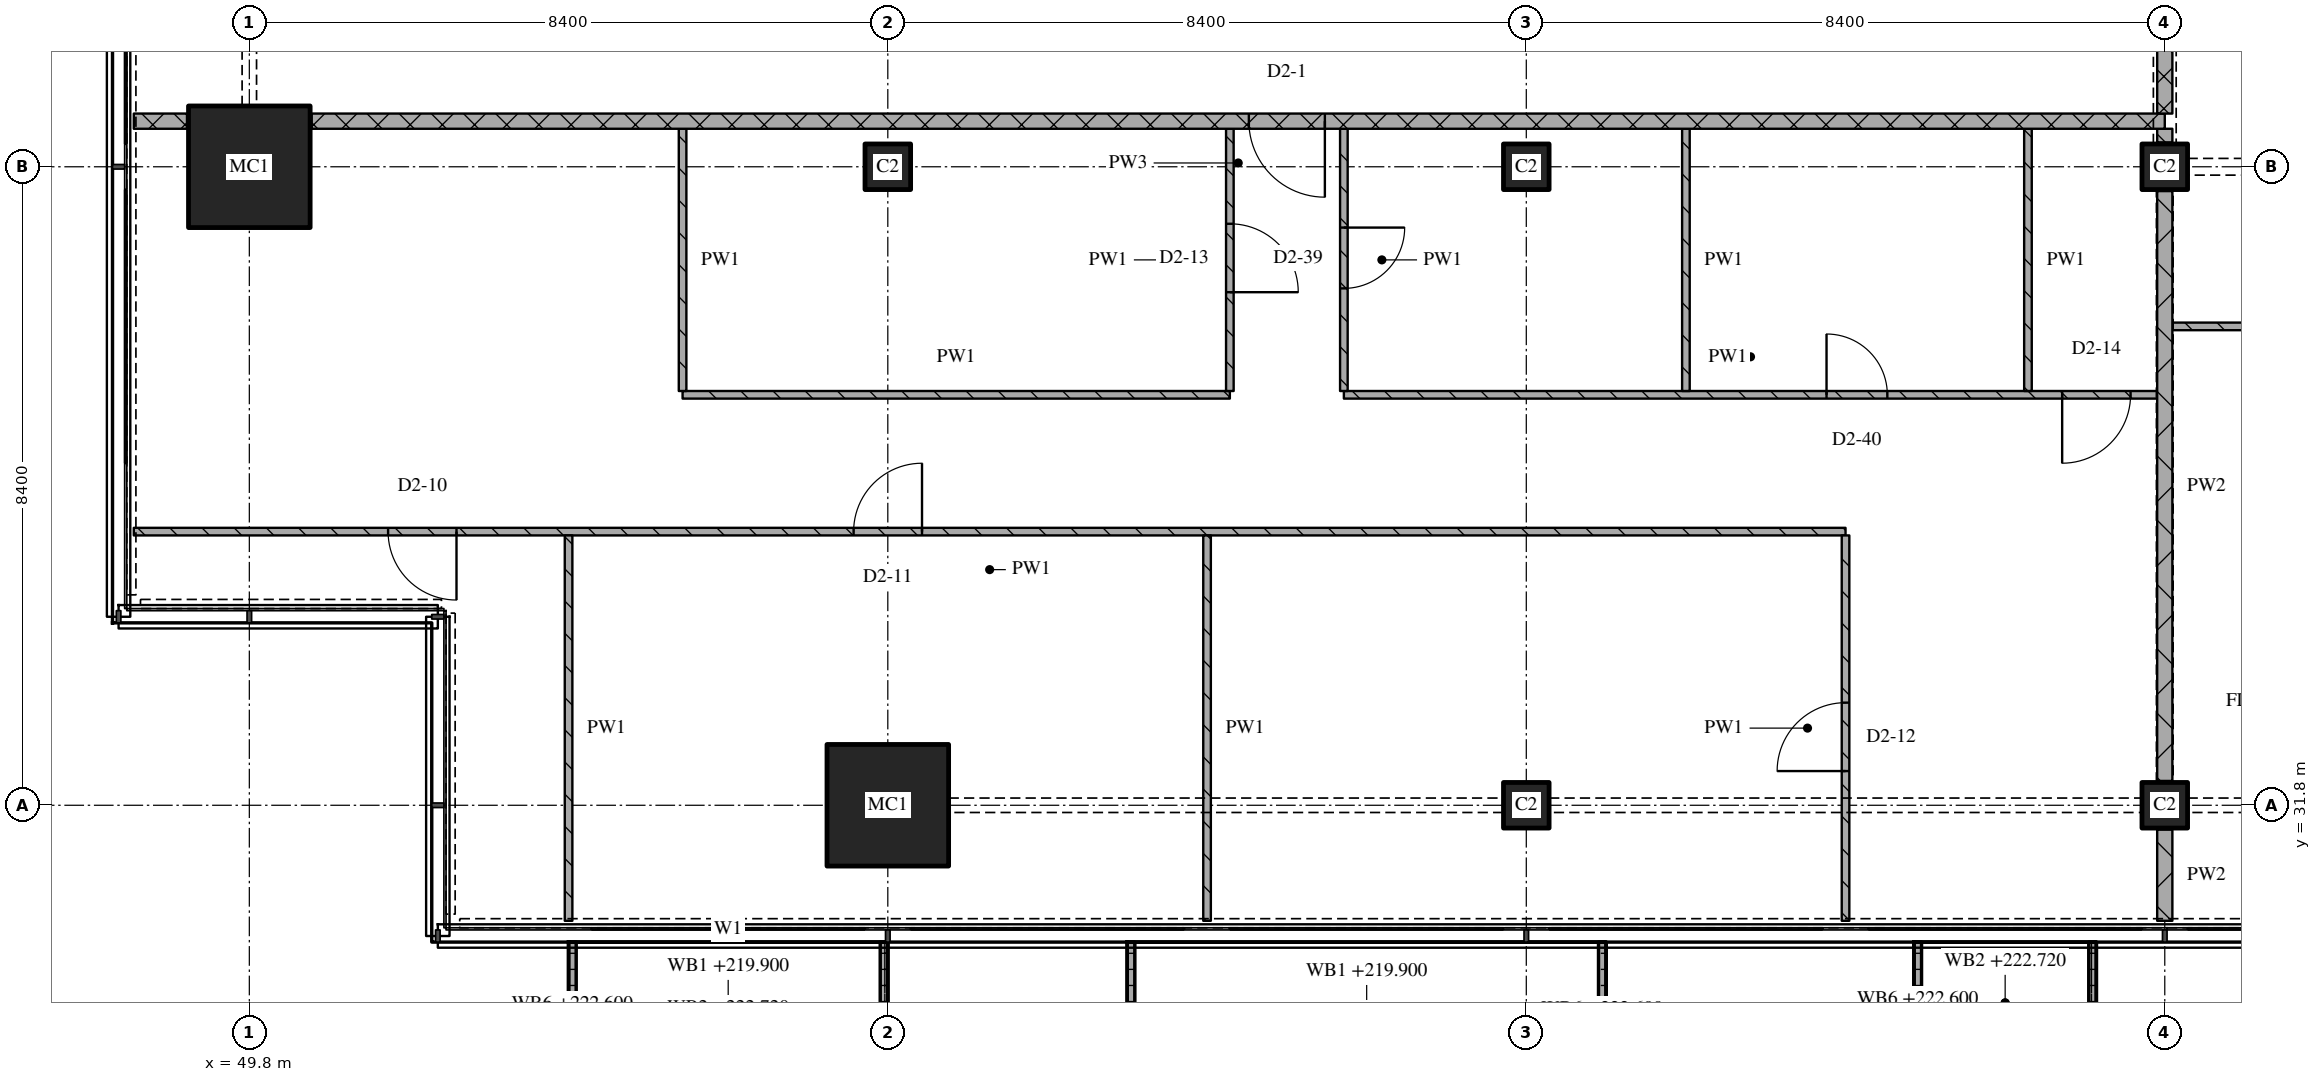
"""IFC4 building model, lengths in metres.
Left out: names, types, materials, properties, quantities, classifications, styles, units other than length and angle.
Written with IfcOpenShell. Run it as: python <this file> out.ifc"""

import sys

from ifc_helpers import new_model, si_unit, direction, frame, frame_2d, origin, origin_2d, place, context, subcontext, project, spatial, polyline, rectangle, outline, extrude, element, fill, save


model = new_model("IFC4")
c1 = context("Model", 3, precision=1e-05, world=origin(), true_north=direction((0.0, 1.0)))
c2 = subcontext(c1, "Body", "Model", "MODEL_VIEW")
j1 = project(units=[si_unit("LENGTHUNIT", "METRE"), si_unit("PLANEANGLEUNIT", "RADIAN")], contexts=[c1])
p1 = place(None, origin())
s1 = spatial("IfcSite", under=j1, at=p1, CompositionType="ELEMENT")
p2 = place(p1, origin())
s2 = spatial("IfcBuilding", under=s1, at=p2, CompositionType="ELEMENT")
p3 = place(p2, frame((0.0, 0.0, 219.9)))
s3 = spatial("IfcBuildingStorey", under=s2, at=p3, CompositionType="ELEMENT", Elevation=219.9)
for number, where, z_axis, x_axis in (
    (1, (49.8, 40.2, 0.0), (0.0, 0.0, 1.0), (1.0, 0.0, 0.0)),
    (2, (58.2, 31.8, 0.0), (0.0, 0.0, 1.0), (1.0, 0.0, 0.0)),
):
    element("IfcColumn", number, at=place(p3, frame(where, z_axis=z_axis, x_axis=x_axis)), inside=s3, PredefinedType="COLUMN", context=c2, shape_type="SweptSolid", body=[
        extrude(rectangle(XDim=1.6, YDim=1.6, at=origin_2d()), origin(), (0.0, 0.0, 1.0), 3.6),
    ])
for number, where, z_axis, x_axis in (
    (3, (58.2, 40.2, 0.0), (0.0, 0.0, 1.0), (1.0, 0.0, 0.0)),
    (4, (66.6, 31.8, 0.0), (0.0, 0.0, 1.0), (1.0, 0.0, 0.0)),
    (5, (66.6, 40.2, 0.0), (0.0, 0.0, 1.0), (1.0, 0.0, 0.0)),
    (6, (75.0, 31.8, 0.0), (0.0, 0.0, 1.0), (1.0, 0.0, 0.0)),
    (7, (75.0, 40.2, 0.0), (0.0, 0.0, 1.0), (1.0, 0.0, 0.0)),
):
    element("IfcColumn", number, at=place(p3, frame(where, z_axis=z_axis, x_axis=x_axis)), inside=s3, PredefinedType="COLUMN", context=c2, shape_type="SweptSolid", body=[
        extrude(rectangle(XDim=0.6, YDim=0.6, at=origin_2d()), origin(), (0.0, 0.0, 1.0), 3.6),
    ])
p4 = place(p3, origin())
e8 = element("IfcWall", 8, at=p4, inside=s3, PredefinedType="SOLIDWALL", context=c2, shape_type="SweptSolid", body=[
    extrude(outline(polyline([(54.0, 30.0), (54.1, 30.0), (54.1, 28.367), (58.1, 28.367), (58.1, 30.0), (58.2, 30.0), (58.2, 28.267), (54.0, 28.267), (54.0, 30.0)])), origin(), (0.0, 0.0, 1.0), 1.0),
])
p5 = place(p3, origin())
e9 = element("IfcWall", 9, at=p5, inside=s3, PredefinedType="SOLIDWALL", context=c2, shape_type="SweptSolid", body=[
    extrude(outline(polyline([(61.35, 30.0), (61.45, 30.0), (61.45, 28.233), (67.55, 28.233), (67.55, 30.0), (67.65, 30.0), (67.65, 28.133), (61.35, 28.133), (61.35, 30.0)])), origin(), (0.0, 0.0, 1.0), 1.0),
])
p6 = place(p3, origin())
e10 = element("IfcWall", 10, at=p6, inside=s3, PredefinedType="SOLIDWALL", context=c2, shape_type="SweptSolid", body=[
    extrude(outline(polyline([(71.7, 30.0), (71.8, 30.0), (71.8, 28.5), (74.0, 28.5), (74.0, 30.0), (74.1, 30.0), (74.1, 28.4), (71.7, 28.4), (71.7, 30.0)])), origin(), (0.0, 0.0, 1.0), 1.0),
])
p7 = place(p3, frame((70.8, 35.4, 0.0), z_axis=(0.0, 0.0, 1.0), x_axis=(-1.0, 0.0, 0.0)))
e11 = element("IfcWall", 11, at=p7, inside=s3, PredefinedType="PARTITIONING", context=c2, shape_type="SweptSolid", body=[
    extrude(rectangle(XDim=22.52, YDim=0.1, at=frame_2d((11.26, 0.0))), origin(), (0.0, 0.0, 1.0), 3.32),
])
p8 = place(p7, frame((12.15, 0.0, 0.0)))
e12 = element("IfcOpeningElement", 12, at=p8, cuts=e11, PredefinedType="OPENING", context=c2, shape_type="SweptSolid", body=[
    extrude(rectangle(XDim=0.9, YDim=2.1, at=frame_2d((0.45, 1.05))), frame((0.0, 0.06, 0.0), z_axis=(0.0, -1.0, 0.0), x_axis=(1.0, 0.0, 0.0)), (0.0, 0.0, 1.0), 0.12),
])
p9 = place(p7, frame((18.274, 0.0, 0.0)))
e13 = element("IfcOpeningElement", 13, at=p9, cuts=e11, PredefinedType="OPENING", context=c2, shape_type="SweptSolid", body=[
    extrude(rectangle(XDim=0.9, YDim=2.1, at=frame_2d((0.45, 1.05))), frame((0.0, 0.06, 0.0), z_axis=(0.0, -1.0, 0.0), x_axis=(1.0, 0.0, 0.0)), (0.0, 0.0, 1.0), 0.12),
])
p10 = place(p3, frame((55.5, 37.2, 0.0), z_axis=(0.0, 0.0, 1.0), x_axis=(1.0, 0.0, 0.0)))
e14 = element("IfcWall", 14, at=p10, inside=s3, PredefinedType="PARTITIONING", context=c2, shape_type="SweptSolid", body=[
    extrude(rectangle(XDim=7.2, YDim=0.1, at=frame_2d((3.6, 0.0))), origin(), (0.0, 0.0, 1.0), 3.32),
])
p11 = place(p3, frame((64.2, 37.2, 0.0), z_axis=(0.0, 0.0, 1.0), x_axis=(1.0, 0.0, 0.0)))
e15 = element("IfcWall", 15, at=p11, inside=s3, PredefinedType="PARTITIONING", context=c2, shape_type="SweptSolid", body=[
    extrude(rectangle(XDim=10.7, YDim=0.1, at=frame_2d((5.35, 0.0))), origin(), (0.0, 0.0, 1.0), 3.32),
])
p12 = place(p11, frame((6.35, 0.0, 0.0)))
e16 = element("IfcOpeningElement", 16, at=p12, cuts=e15, PredefinedType="OPENING", context=c2, shape_type="SweptSolid", body=[
    extrude(rectangle(XDim=0.8, YDim=2.1, at=frame_2d((0.4, 1.05))), frame((0.0, 0.06, 0.0), z_axis=(0.0, -1.0, 0.0), x_axis=(1.0, 0.0, 0.0)), (0.0, 0.0, 1.0), 0.12),
])
p13 = place(p11, frame((9.45, 0.0, 0.0)))
e17 = element("IfcOpeningElement", 17, at=p13, cuts=e15, PredefinedType="OPENING", context=c2, shape_type="SweptSolid", body=[
    extrude(rectangle(XDim=0.9, YDim=2.1, at=frame_2d((0.45, 1.05))), frame((0.0, 0.06, 0.0), z_axis=(0.0, -1.0, 0.0), x_axis=(1.0, 0.0, 0.0)), (0.0, 0.0, 1.0), 0.12),
])
p14 = place(p3, frame((75.1, 38.1, 0.0), z_axis=(0.0, 0.0, 1.0), x_axis=(1.0, 0.0, 0.0)))
e18 = element("IfcWall", 18, at=p14, inside=s3, PredefinedType="PARTITIONING", context=c2, shape_type="SweptSolid", body=[
    extrude(rectangle(XDim=11.3, YDim=0.1, at=frame_2d((5.65, 0.0))), origin(), (0.0, 0.0, 1.0), 3.32),
])
p15 = place(p14, frame((1.75, 0.0, 0.0)))
e19 = element("IfcOpeningElement", 19, at=p15, cuts=e18, PredefinedType="OPENING", context=c2, shape_type="SweptSolid", body=[
    extrude(rectangle(XDim=0.8, YDim=2.1, at=frame_2d((0.4, 1.05))), frame((0.0, 0.06, 0.0), z_axis=(0.0, -1.0, 0.0), x_axis=(1.0, 0.0, 0.0)), (0.0, 0.0, 1.0), 0.12),
])
p16 = place(p14, frame((6.25, 0.0, 0.0)))
e20 = element("IfcOpeningElement", 20, at=p16, cuts=e18, PredefinedType="OPENING", context=c2, shape_type="SweptSolid", body=[
    extrude(rectangle(XDim=0.8, YDim=2.1, at=frame_2d((0.4, 1.05))), frame((0.0, 0.06, 0.0), z_axis=(0.0, -1.0, 0.0), x_axis=(1.0, 0.0, 0.0)), (0.0, 0.0, 1.0), 0.12),
])
p17 = place(p14, frame((9.65, 0.0, 0.0)))
e21 = element("IfcOpeningElement", 21, at=p17, cuts=e18, PredefinedType="OPENING", context=c2, shape_type="SweptSolid", body=[
    extrude(rectangle(XDim=0.9, YDim=2.1, at=frame_2d((0.45, 1.05))), frame((0.0, 0.06, 0.0), z_axis=(0.0, -1.0, 0.0), x_axis=(1.0, 0.0, 0.0)), (0.0, 0.0, 1.0), 0.12),
])
p18 = place(p3, frame((48.28, 40.8, 0.0), z_axis=(0.0, 0.0, 1.0), x_axis=(1.0, 0.0, 0.0)))
e22 = element("IfcWall", 22, at=p18, inside=s3, PredefinedType="PARTITIONING", context=c2, shape_type="SweptSolid", body=[
    extrude(rectangle(XDim=0.7, YDim=0.2, at=frame_2d((0.35, 0.0))), origin(), (0.0, 0.0, 1.0), 3.32),
])
p19 = place(p3, frame((75.0, 40.8, 0.0), z_axis=(0.0, 0.0, 1.0), x_axis=(-1.0, 0.0, 0.0)))
e23 = element("IfcWall", 23, at=p19, inside=s3, PredefinedType="PARTITIONING", context=c2, shape_type="SweptSolid", body=[
    extrude(rectangle(XDim=24.38, YDim=0.2, at=frame_2d((12.19, 0.0))), origin(), (0.0, 0.0, 1.0), 3.32),
])
p20 = place(p19, frame((11.05, 0.0, 0.0)))
e24 = element("IfcOpeningElement", 24, at=p20, cuts=e23, PredefinedType="OPENING", context=c2, shape_type="SweptSolid", body=[
    extrude(rectangle(XDim=1.0, YDim=2.1, at=frame_2d((0.5, 1.05))), frame((0.0, 0.11, 0.0), z_axis=(0.0, -1.0, 0.0), x_axis=(1.0, 0.0, 0.0)), (0.0, 0.0, 1.0), 0.22),
])
p21 = place(p3, frame((54.0, 35.35, 0.0), z_axis=(0.0, 0.0, 1.0), x_axis=(0.0, -1.0, 0.0)))
e25 = element("IfcWall", 25, at=p21, inside=s3, PredefinedType="PARTITIONING", context=c2, shape_type="SweptSolid", body=[
    extrude(rectangle(XDim=5.07, YDim=0.1, at=frame_2d((2.535, 0.0))), origin(), (0.0, 0.0, 1.0), 3.32),
])
p22 = place(p3, frame((55.5, 40.7, 0.0), z_axis=(0.0, 0.0, 1.0), x_axis=(0.0, -1.0, 0.0)))
e26 = element("IfcWall", 26, at=p22, inside=s3, PredefinedType="PARTITIONING", context=c2, shape_type="SweptSolid", body=[
    extrude(rectangle(XDim=3.45, YDim=0.1, at=frame_2d((1.725, 0.0))), origin(), (0.0, 0.0, 1.0), 3.32),
])
p23 = place(p3, frame((62.4, 35.35, 0.0), z_axis=(0.0, 0.0, 1.0), x_axis=(0.0, -1.0, 0.0)))
e27 = element("IfcWall", 27, at=p23, inside=s3, PredefinedType="PARTITIONING", context=c2, shape_type="SweptSolid", body=[
    extrude(rectangle(XDim=5.07, YDim=0.1, at=frame_2d((2.535, 0.0))), origin(), (0.0, 0.0, 1.0), 3.32),
])
p24 = place(p3, frame((62.7, 37.25, 0.0), z_axis=(0.0, 0.0, 1.0), x_axis=(0.0, 1.0, 0.0)))
e28 = element("IfcWall", 28, at=p24, inside=s3, PredefinedType="PARTITIONING", context=c2, shape_type="SweptSolid", body=[
    extrude(rectangle(XDim=3.45, YDim=0.1, at=frame_2d((1.725, 0.0))), origin(), (0.0, 0.0, 1.0), 3.32),
])
p25 = place(p24, frame((1.3, 0.0, 0.0)))
e29 = element("IfcOpeningElement", 29, at=p25, cuts=e28, PredefinedType="OPENING", context=c2, shape_type="SweptSolid", body=[
    extrude(rectangle(XDim=0.9, YDim=2.1, at=frame_2d((0.45, 1.05))), frame((0.0, 0.06, 0.0), z_axis=(0.0, -1.0, 0.0), x_axis=(1.0, 0.0, 0.0)), (0.0, 0.0, 1.0), 0.12),
])
p26 = place(p3, frame((64.2, 40.7, 0.0), z_axis=(0.0, 0.0, 1.0), x_axis=(0.0, -1.0, 0.0)))
e30 = element("IfcWall", 30, at=p26, inside=s3, PredefinedType="PARTITIONING", context=c2, shape_type="SweptSolid", body=[
    extrude(rectangle(XDim=3.45, YDim=0.1, at=frame_2d((1.725, 0.0))), origin(), (0.0, 0.0, 1.0), 3.32),
])
p27 = place(p26, frame((1.3, 0.0, 0.0)))
e31 = element("IfcOpeningElement", 31, at=p27, cuts=e30, PredefinedType="OPENING", context=c2, shape_type="SweptSolid", body=[
    extrude(rectangle(XDim=0.8, YDim=2.1, at=frame_2d((0.4, 1.05))), frame((0.0, 0.06, 0.0), z_axis=(0.0, -1.0, 0.0), x_axis=(1.0, 0.0, 0.0)), (0.0, 0.0, 1.0), 0.12),
])
p28 = place(p3, frame((68.7, 40.7, 0.0), z_axis=(0.0, 0.0, 1.0), x_axis=(0.0, -1.0, 0.0)))
e32 = element("IfcWall", 32, at=p28, inside=s3, PredefinedType="PARTITIONING", context=c2, shape_type="SweptSolid", body=[
    extrude(rectangle(XDim=3.45, YDim=0.1, at=frame_2d((1.725, 0.0))), origin(), (0.0, 0.0, 1.0), 3.32),
])
p29 = place(p3, frame((70.8, 30.28, 0.0), z_axis=(0.0, 0.0, 1.0), x_axis=(0.0, 1.0, 0.0)))
e33 = element("IfcWall", 33, at=p29, inside=s3, PredefinedType="PARTITIONING", context=c2, shape_type="SweptSolid", body=[
    extrude(rectangle(XDim=5.07, YDim=0.1, at=frame_2d((2.535, 0.0))), origin(), (0.0, 0.0, 1.0), 3.32),
])
p30 = place(p29, frame((1.97, 0.0, 0.0)))
e34 = element("IfcOpeningElement", 34, at=p30, cuts=e33, PredefinedType="OPENING", context=c2, shape_type="SweptSolid", body=[
    extrude(rectangle(XDim=0.9, YDim=2.1, at=frame_2d((0.45, 1.05))), frame((0.0, 0.06, 0.0), z_axis=(0.0, -1.0, 0.0), x_axis=(1.0, 0.0, 0.0)), (0.0, 0.0, 1.0), 0.12),
])
p31 = place(p3, frame((73.2, 40.7, 0.0), z_axis=(0.0, 0.0, 1.0), x_axis=(0.0, -1.0, 0.0)))
e35 = element("IfcWall", 35, at=p31, inside=s3, PredefinedType="PARTITIONING", context=c2, shape_type="SweptSolid", body=[
    extrude(rectangle(XDim=3.45, YDim=0.1, at=frame_2d((1.725, 0.0))), origin(), (0.0, 0.0, 1.0), 3.32),
])
p32 = place(p3, frame((75.0, 43.1, 0.0), z_axis=(0.0, 0.0, 1.0), x_axis=(0.0, -1.0, 0.0)))
e36 = element("IfcWall", 36, at=p32, inside=s3, PredefinedType="PARTITIONING", context=c2, shape_type="SweptSolid", body=[
    extrude(rectangle(XDim=2.2, YDim=0.2, at=frame_2d((1.1, 0.0))), origin(), (0.0, 0.0, 1.0), 2.53),
])
p33 = place(p3, frame((75.0, 31.48, 0.0), z_axis=(0.0, 0.0, 1.0), x_axis=(0.0, -1.0, 0.0)))
e37 = element("IfcWall", 37, at=p33, inside=s3, PredefinedType="PARTITIONING", context=c2, shape_type="SweptSolid", body=[
    extrude(rectangle(XDim=1.2, YDim=0.2, at=frame_2d((0.6, 0.0))), origin(), (0.0, 0.0, 1.0), 3.32),
])
p34 = place(p3, frame((75.0, 39.88, 0.0), z_axis=(0.0, 0.0, 1.0), x_axis=(0.0, -1.0, 0.0)))
e38 = element("IfcWall", 38, at=p34, inside=s3, PredefinedType="PARTITIONING", context=c2, shape_type="SweptSolid", body=[
    extrude(rectangle(XDim=7.76, YDim=0.2, at=frame_2d((3.88, 0.0))), origin(), (0.0, 0.0, 1.0), 2.72),
])
p35 = place(p3, frame((75.0, 40.7, 0.0), z_axis=(0.0, 0.0, 1.0), x_axis=(0.0, -1.0, 0.0)))
e39 = element("IfcWall", 39, at=p35, inside=s3, PredefinedType="PARTITIONING", context=c2, shape_type="SweptSolid", body=[
    extrude(rectangle(XDim=0.18, YDim=0.2, at=frame_2d((0.09, 0.0))), origin(), (0.0, 0.0, 1.0), 3.32),
])
p36 = place(p8, origin())
e40 = element("IfcDoor", 40, at=p36, inside=s3, OperationType="SINGLE_SWING_RIGHT", PredefinedType="DOOR", context=c2, shape_type="SweptSolid", body=[
    extrude(rectangle(XDim=0.9, YDim=2.1, at=frame_2d((0.45, 1.05))), frame((0.0, 0.025, 0.0), z_axis=(0.0, -1.0, 0.0), x_axis=(1.0, 0.0, 0.0)), (0.0, 0.0, 1.0), 0.05),
])
fill(e12, e40)
p37 = place(p9, origin())
e41 = element("IfcDoor", 41, at=p37, inside=s3, OperationType="SINGLE_SWING_LEFT", PredefinedType="DOOR", context=c2, shape_type="SweptSolid", body=[
    extrude(rectangle(XDim=0.9, YDim=2.1, at=frame_2d((0.45, 1.05))), frame((0.0, 0.025, 0.0), z_axis=(0.0, -1.0, 0.0), x_axis=(1.0, 0.0, 0.0)), (0.0, 0.0, 1.0), 0.05),
])
fill(e13, e41)
p38 = place(p12, origin())
e42 = element("IfcDoor", 42, at=p38, inside=s3, OperationType="SINGLE_SWING_LEFT", PredefinedType="DOOR", context=c2, shape_type="SweptSolid", body=[
    extrude(rectangle(XDim=0.8, YDim=2.1, at=frame_2d((0.4, 1.05))), frame((0.0, 0.025, 0.0), z_axis=(0.0, -1.0, 0.0), x_axis=(1.0, 0.0, 0.0)), (0.0, 0.0, 1.0), 0.05),
])
fill(e16, e42)
p39 = place(p13, origin())
e43 = element("IfcDoor", 43, at=p39, inside=s3, OperationType="SINGLE_SWING_RIGHT", PredefinedType="DOOR", context=c2, shape_type="SweptSolid", body=[
    extrude(rectangle(XDim=0.9, YDim=2.1, at=frame_2d((0.45, 1.05))), frame((0.0, 0.025, 0.0), z_axis=(0.0, -1.0, 0.0), x_axis=(1.0, 0.0, 0.0)), (0.0, 0.0, 1.0), 0.05),
])
fill(e17, e43)
p40 = place(p20, origin())
e44 = element("IfcDoor", 44, at=p40, inside=s3, OperationType="SINGLE_SWING_LEFT", PredefinedType="DOOR", context=c2, shape_type="SweptSolid", body=[
    extrude(rectangle(XDim=1.0, YDim=2.1, at=frame_2d((0.5, 1.05))), frame((0.0, 0.025, 0.0), z_axis=(0.0, -1.0, 0.0), x_axis=(1.0, 0.0, 0.0)), (0.0, 0.0, 1.0), 0.05),
])
fill(e24, e44)
p41 = place(p25, origin())
e45 = element("IfcDoor", 45, at=p41, inside=s3, OperationType="SINGLE_SWING_RIGHT", PredefinedType="DOOR", context=c2, shape_type="SweptSolid", body=[
    extrude(rectangle(XDim=0.9, YDim=2.1, at=frame_2d((0.45, 1.05))), frame((0.0, 0.025, 0.0), z_axis=(0.0, -1.0, 0.0), x_axis=(1.0, 0.0, 0.0)), (0.0, 0.0, 1.0), 0.05),
])
fill(e29, e45)
p42 = place(p27, origin())
e46 = element("IfcDoor", 46, at=p42, inside=s3, OperationType="SINGLE_SWING_LEFT", PredefinedType="DOOR", context=c2, shape_type="SweptSolid", body=[
    extrude(rectangle(XDim=0.8, YDim=2.1, at=frame_2d((0.4, 1.05))), frame((0.0, 0.025, 0.0), z_axis=(0.0, -1.0, 0.0), x_axis=(1.0, 0.0, 0.0)), (0.0, 0.0, 1.0), 0.05),
])
fill(e31, e46)
p43 = place(p30, origin())
e47 = element("IfcDoor", 47, at=p43, inside=s3, OperationType="SINGLE_SWING_LEFT", PredefinedType="DOOR", context=c2, shape_type="SweptSolid", body=[
    extrude(rectangle(XDim=0.9, YDim=2.1, at=frame_2d((0.45, 1.05))), frame((0.0, 0.025, 0.0), z_axis=(0.0, -1.0, 0.0), x_axis=(1.0, 0.0, 0.0)), (0.0, 0.0, 1.0), 0.05),
])
fill(e34, e47)
save(model, sys.argv[1])
